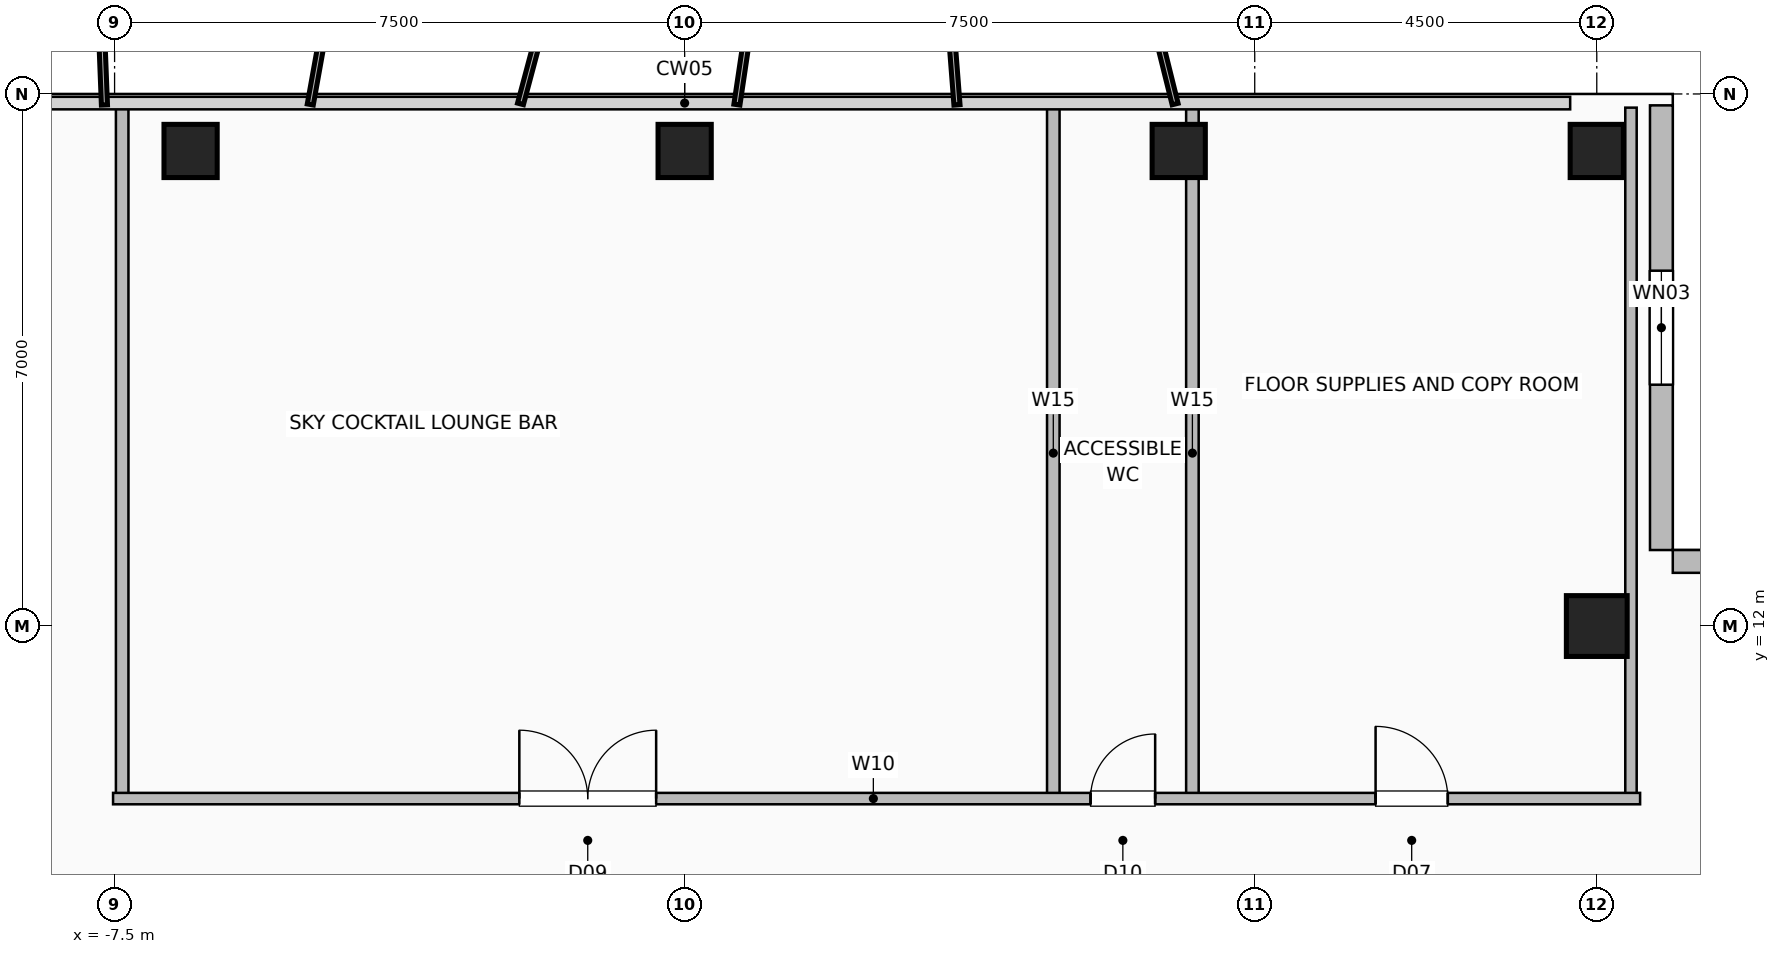
"""IFC4 building model, lengths in metres.
Left out: names, types, materials, properties, quantities, classifications, styles, units other than length and angle.
Written with IfcOpenShell. Run it as: python <this file> out.ifc"""

import sys

from ifc_helpers import new_model, si_unit, direction, frame, frame_2d, origin, origin_2d, place, context, subcontext, project, spatial, rectangle, hollow_rectangle, extrude, element, fill, save


model = new_model("IFC4")
c1 = context("Model", 3, precision=1e-05, world=origin(), true_north=direction((0.0, 1.0)))
c2 = subcontext(c1, "Body", "Model", "MODEL_VIEW")
j1 = project(units=[si_unit("LENGTHUNIT", "METRE"), si_unit("PLANEANGLEUNIT", "RADIAN")], contexts=[c1])
p1 = place(None, origin())
s1 = spatial("IfcSite", under=j1, at=p1, CompositionType="ELEMENT")
p2 = place(p1, origin())
s2 = spatial("IfcBuilding", under=s1, at=p2, CompositionType="ELEMENT")
p3 = place(p2, frame((0.0, 0.0, 261.2)))
s3 = spatial("IfcBuildingStorey", under=s2, at=p3, CompositionType="ELEMENT", Elevation=261.2)
for number, where, z_axis, x_axis in (
    (1, (-6.5, 18.25, 0.0), (0.0, 0.0, 1.0), (1.0, 0.0, 0.0)),
    (2, (0.0, 18.25, 0.0), (0.0, 0.0, 1.0), (1.0, 0.0, 0.0)),
    (3, (6.5, 18.25, 0.0), (0.0, 0.0, 1.0), (1.0, 0.0, 0.0)),
    (4, (12.0, 18.25, 0.0), (0.0, 0.0, 1.0), (1.0, 0.0, 0.0)),
):
    element("IfcColumn", number, at=place(p3, frame(where, z_axis=z_axis, x_axis=x_axis)), inside=s3, PredefinedType="COLUMN", context=c2, shape_type="SweptSolid", body=[
        extrude(hollow_rectangle(XDim=0.7, YDim=0.7, WallThickness=0.035, at=origin_2d()), origin(), (0.0, 0.0, 1.0), 3.6),
    ])
p4 = place(p3, frame((12.0, 12.0, 0.0), z_axis=(0.0, 0.0, 1.0), x_axis=(1.0, 0.0, 0.0)))
e5 = element("IfcColumn", 5, at=p4, inside=s3, PredefinedType="COLUMN", context=c2, shape_type="SweptSolid", body=[
    extrude(hollow_rectangle(XDim=0.8, YDim=0.8, WallThickness=0.04, at=origin_2d()), origin(), (0.0, 0.0, 1.0), 3.6),
])
p5 = place(p3, frame((12.85, 18.85, 0.0), z_axis=(0.0, 0.0, 1.0), x_axis=(0.0, -1.0, 0.0)))
e6 = element("IfcWall", 6, at=p5, inside=s3, PredefinedType="SOLIDWALL", context=c2, shape_type="SweptSolid", body=[
    extrude(rectangle(XDim=5.85, YDim=0.3, at=frame_2d((2.925, 0.0))), origin(), (0.0, 0.0, 1.0), 3.36),
])
p6 = place(p5, frame((2.175, 0.0, 0.9)))
e7 = element("IfcOpeningElement", 7, at=p6, cuts=e6, PredefinedType="OPENING", context=c2, shape_type="SweptSolid", body=[
    extrude(rectangle(XDim=1.5, YDim=1.8, at=frame_2d((0.75, 0.9))), frame((0.0, 0.16, 0.0), z_axis=(0.0, -1.0, 0.0), x_axis=(1.0, 0.0, 0.0)), (0.0, 0.0, 1.0), 0.32),
])
p7 = place(p3, frame((18.85, 12.85, 0.0), z_axis=(0.0, 0.0, 1.0), x_axis=(-1.0, 0.0, 0.0)))
e8 = element("IfcWall", 8, at=p7, inside=s3, PredefinedType="SOLIDWALL", context=c2, shape_type="SweptSolid", body=[
    extrude(rectangle(XDim=5.85, YDim=0.3, at=frame_2d((2.925, 0.0))), origin(), (0.0, 0.0, 1.0), 3.36),
])
for number, where, z_axis, x_axis in (
    (9, (6.68, 9.73, 0.0), (0.0, 0.0, 1.0), (0.0, 1.0, 0.0)),
    (10, (-7.4, 9.73, 0.0), (0.0, 0.0, 1.0), (0.0, 1.0, 0.0)),
    (11, (4.85, 9.73, 0.0), (0.0, 0.0, 1.0), (0.0, 1.0, 0.0)),
):
    element("IfcWall", number, at=place(p3, frame(where, z_axis=z_axis, x_axis=x_axis)), inside=s3, PredefinedType="PLUMBINGWALL", context=c2, shape_type="SweptSolid", body=[
        extrude(rectangle(XDim=9.09, YDim=0.165, at=frame_2d((4.545, 0.0))), origin(), (0.0, 0.0, 1.0), 3.36),
    ])
p8 = place(p3, frame((12.45, 9.73, 0.0), z_axis=(0.0, 0.0, 1.0), x_axis=(0.0, 1.0, 0.0)))
e12 = element("IfcWall", 12, at=p8, inside=s3, PredefinedType="PARTITIONING", context=c2, shape_type="SweptSolid", body=[
    extrude(rectangle(XDim=9.09, YDim=0.15, at=frame_2d((4.545, 0.0))), origin(), (0.0, 0.0, 1.0), 3.36),
])
p9 = place(p3, frame((-7.52, 9.73, 0.0), z_axis=(0.0, 0.0, 1.0), x_axis=(1.0, 0.0, 0.0)))
e13 = element("IfcWall", 13, at=p9, inside=s3, PredefinedType="PARTITIONING", context=c2, shape_type="SweptSolid", body=[
    extrude(rectangle(XDim=20.09, YDim=0.15, at=frame_2d((10.045, 0.0))), origin(), (0.0, 0.0, 1.0), 3.36),
])
p10 = place(p9, frame((5.345, 0.0, 0.0)))
e14 = element("IfcOpeningElement", 14, at=p10, cuts=e13, PredefinedType="OPENING", context=c2, shape_type="SweptSolid", body=[
    extrude(rectangle(XDim=1.8, YDim=2.08, at=frame_2d((0.9, 1.04))), frame((0.0, 0.085, 0.0), z_axis=(0.0, -1.0, 0.0), x_axis=(1.0, 0.0, 0.0)), (0.0, 0.0, 1.0), 0.17),
])
p11 = place(p9, frame((12.86, 0.0, 0.0)))
e15 = element("IfcOpeningElement", 15, at=p11, cuts=e13, PredefinedType="OPENING", context=c2, shape_type="SweptSolid", body=[
    extrude(rectangle(XDim=0.85, YDim=2.05, at=frame_2d((0.425, 1.025))), frame((0.0, 0.085, 0.0), z_axis=(0.0, -1.0, 0.0), x_axis=(1.0, 0.0, 0.0)), (0.0, 0.0, 1.0), 0.17),
])
p12 = place(p9, frame((16.61, 0.0, 0.0)))
e16 = element("IfcOpeningElement", 16, at=p12, cuts=e13, PredefinedType="OPENING", context=c2, shape_type="SweptSolid", body=[
    extrude(rectangle(XDim=0.95, YDim=2.06, at=frame_2d((0.475, 1.03))), frame((0.0, 0.085, 0.0), z_axis=(0.0, -1.0, 0.0), x_axis=(1.0, 0.0, 0.0)), (0.0, 0.0, 1.0), 0.17),
])
p13 = place(p6, origin())
e17 = element("IfcWindow", 17, at=p13, inside=s3, PartitioningType="SINGLE_PANEL", PredefinedType="WINDOW", context=c2, shape_type="SweptSolid", body=[
    extrude(rectangle(XDim=1.5, YDim=1.8, at=frame_2d((0.75, 0.9))), frame((0.0, 0.03, 0.0), z_axis=(0.0, -1.0, 0.0), x_axis=(1.0, 0.0, 0.0)), (0.0, 0.0, 1.0), 0.06),
])
fill(e7, e17)
p14 = place(p10, origin())
e18 = element("IfcDoor", 18, at=p14, inside=s3, OperationType="DOUBLE_DOOR_SINGLE_SWING", PredefinedType="DOOR", context=c2, shape_type="SweptSolid", body=[
    extrude(rectangle(XDim=1.8, YDim=2.08, at=frame_2d((0.9, 1.04))), frame((0.0, 0.025, 0.0), z_axis=(0.0, -1.0, 0.0), x_axis=(1.0, 0.0, 0.0)), (0.0, 0.0, 1.0), 0.05),
])
fill(e14, e18)
p15 = place(p11, origin())
e19 = element("IfcDoor", 19, at=p15, inside=s3, OperationType="SINGLE_SWING_RIGHT", PredefinedType="DOOR", context=c2, shape_type="SweptSolid", body=[
    extrude(rectangle(XDim=0.85, YDim=2.05, at=frame_2d((0.425, 1.025))), frame((0.0, 0.025, 0.0), z_axis=(0.0, -1.0, 0.0), x_axis=(1.0, 0.0, 0.0)), (0.0, 0.0, 1.0), 0.05),
])
fill(e15, e19)
p16 = place(p12, origin())
e20 = element("IfcDoor", 20, at=p16, inside=s3, OperationType="SINGLE_SWING_LEFT", PredefinedType="DOOR", context=c2, shape_type="SweptSolid", body=[
    extrude(rectangle(XDim=0.95, YDim=2.06, at=frame_2d((0.475, 1.03))), frame((0.0, 0.025, 0.0), z_axis=(0.0, -1.0, 0.0), x_axis=(1.0, 0.0, 0.0)), (0.0, 0.0, 1.0), 0.05),
])
fill(e16, e20)
save(model, sys.argv[1])
